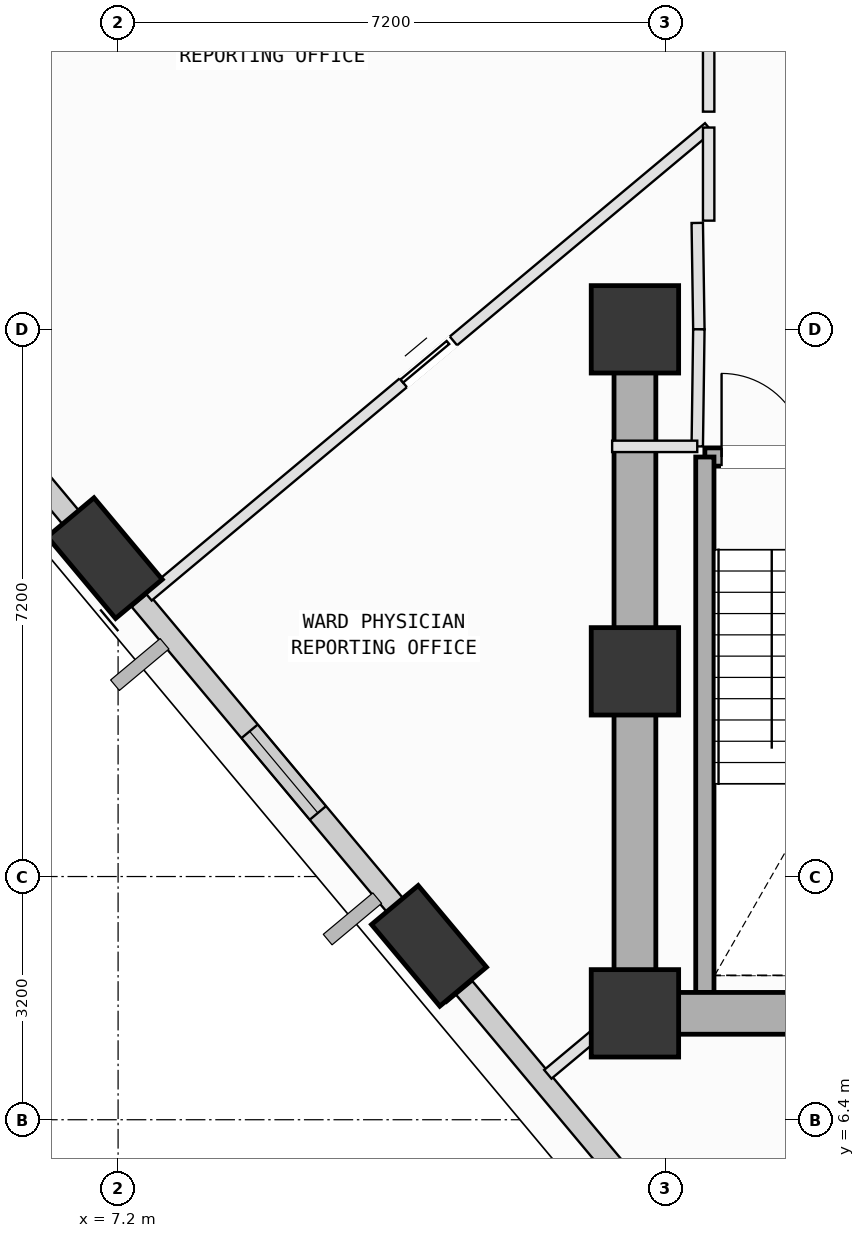
"""IFC4 building model, lengths in metres.
Left out: names, types, materials, properties, quantities, classifications, styles, units other than length and angle.
Written with IfcOpenShell. Run it as: python <this file> out.ifc"""

import sys

from ifc_helpers import new_model, si_unit, direction, frame, frame_2d, origin, origin_2d, place, context, subcontext, project, spatial, rectangle, extrude, element, fill, save


model = new_model("IFC4")
c1 = context("Model", 3, precision=1e-05, world=origin(), true_north=direction((0.0, 1.0)))
c2 = subcontext(c1, "Body", "Model", "MODEL_VIEW")
j1 = project(units=[si_unit("LENGTHUNIT", "METRE"), si_unit("PLANEANGLEUNIT", "RADIAN")], contexts=[c1])
p1 = place(None, origin())
s1 = spatial("IfcSite", under=j1, at=p1, CompositionType="ELEMENT")
p2 = place(p1, origin())
s2 = spatial("IfcBuilding", under=s1, at=p2, CompositionType="ELEMENT")
p3 = place(p2, frame((0.0, 0.0, 193.8)))
s3 = spatial("IfcBuildingStorey", under=s2, at=p3, CompositionType="ELEMENT", Elevation=193.8)
for number, where, z_axis, x_axis in (
    (1, (14.0, 7.8, 0.0), (0.0, 0.0, 1.0), (1.0, 0.0, 0.0)),
    (2, (14.0, 12.3, 0.0), (0.0, 0.0, 1.0), (1.0, 0.0, 0.0)),
    (3, (14.0, 16.8, 0.0), (0.0, 0.0, 1.0), (1.0, 0.0, 0.0)),
):
    element("IfcColumn", number, at=place(p3, frame(where, z_axis=z_axis, x_axis=x_axis)), inside=s3, PredefinedType="COLUMN", context=c2, shape_type="SweptSolid", body=[
        extrude(rectangle(XDim=1.15, YDim=1.15, at=origin_2d()), origin(), (0.0, 0.0, 1.0), 4.0),
    ])
p4 = place(p3, frame((7.025, 13.79, 0.002), z_axis=(0.046223942846, -0.109008432146, 0.992965512407), x_axis=(-0.8879381116, 0.450904474812, 0.090835370657)))
e4 = element("IfcColumn", 4, at=p4, inside=s3, PredefinedType="COLUMN", context=c2, shape_type="SweptSolid", body=[
    extrude(rectangle(XDim=1.4, YDim=0.8, at=origin_2d()), origin(), (0.0, 0.0, 1.0), 4.025),
])
p5 = place(p3, frame((11.291, 8.688, 0.002), z_axis=(0.06713117767, -0.091349387336, 0.993553568972), x_axis=(-0.968253797519, 0.234352396494, 0.08696860265)))
e5 = element("IfcColumn", 5, at=p5, inside=s3, PredefinedType="COLUMN", context=c2, shape_type="SweptSolid", body=[
    extrude(rectangle(XDim=1.4, YDim=0.8, at=origin_2d()), origin(), (0.0, 0.0, 1.0), 4.022),
])
p6 = place(p3, frame((6.856, 13.992, 0.0), z_axis=(0.0, 0.0, 1.0), x_axis=(-0.641446591331, 0.767167693839, 0.0)))
e6 = element("IfcWall", 6, at=p6, inside=s3, PredefinedType="SOLIDWALL", context=c2, shape_type="SweptSolid", body=[
    extrude(rectangle(XDim=5.628, YDim=0.28, at=frame_2d((2.814, 0.0))), origin(), (0.0, 0.0, 1.0), 3.265),
])
p7 = place(p6, frame((1.811, 0.0, 0.75)))
e7 = element("IfcOpeningElement", 7, at=p7, cuts=e6, PredefinedType="OPENING", context=c2, shape_type="SweptSolid", body=[
    extrude(rectangle(XDim=2.0, YDim=1.95, at=frame_2d((1.0, 0.975))), frame((0.0, 0.15, 0.0), z_axis=(0.0, -1.0, 0.0), x_axis=(1.0, 0.0, 0.0)), (0.0, 0.0, 1.0), 0.3),
])
p8 = place(p3, frame((11.118, 8.894, 0.0), z_axis=(0.0, 0.0, 1.0), x_axis=(-0.641464322238, 0.76715286827, 0.0)))
e8 = element("IfcWall", 8, at=p8, inside=s3, PredefinedType="SOLIDWALL", context=c2, shape_type="SweptSolid", body=[
    extrude(rectangle(XDim=5.662, YDim=0.28, at=frame_2d((2.831, 0.0))), origin(), (0.0, 0.0, 1.0), 3.265),
])
p9 = place(p8, frame((2.011, 0.0, 0.75)))
e9 = element("IfcOpeningElement", 9, at=p9, cuts=e8, PredefinedType="OPENING", context=c2, shape_type="SweptSolid", body=[
    extrude(rectangle(XDim=1.4, YDim=1.85, at=frame_2d((0.7, 0.925))), frame((0.0, 0.15, 0.0), z_axis=(0.0, -1.0, 0.0), x_axis=(1.0, 0.0, 0.0)), (0.0, 0.0, 1.0), 0.3),
])
p10 = place(p3, frame((16.476, 2.487, 0.0), z_axis=(0.0, 0.0, 1.0), x_axis=(-0.641449443944, 0.767165308694, 0.0)))
e10 = element("IfcWall", 10, at=p10, inside=s3, PredefinedType="SOLIDWALL", context=c2, shape_type="SweptSolid", body=[
    extrude(rectangle(XDim=7.36, YDim=0.28, at=frame_2d((3.68, 0.0))), origin(), (0.0, 0.0, 1.0), 3.265),
])
p11 = place(p10, frame((1.888, 0.0, 0.75)))
e11 = element("IfcOpeningElement", 11, at=p11, cuts=e10, PredefinedType="OPENING", context=c2, shape_type="SweptSolid", body=[
    extrude(rectangle(XDim=1.8, YDim=2.05, at=frame_2d((0.9, 1.025))), frame((0.0, 0.15, 0.0), z_axis=(0.0, -1.0, 0.0), x_axis=(1.0, 0.0, 0.0)), (0.0, 0.0, 1.0), 0.3),
])
p12 = place(p3, frame((14.92, 15.12, 0.0), z_axis=(0.0, 0.0, 1.0), x_axis=(1.0, 0.0, 0.0)))
e12 = element("IfcWall", 12, at=p12, inside=s3, PredefinedType="SOLIDWALL", context=c2, shape_type="SweptSolid", body=[
    extrude(rectangle(XDim=3.46, YDim=0.24, at=frame_2d((1.73, 0.0))), origin(), (0.0, 0.0, 1.0), 3.78),
])
p13 = place(p12, frame((0.22, 0.0, 0.0)))
e13 = element("IfcOpeningElement", 13, at=p13, cuts=e12, PredefinedType="OPENING", context=c2, shape_type="SweptSolid", body=[
    extrude(rectangle(XDim=1.1, YDim=2.15, at=frame_2d((0.55, 1.075))), frame((0.0, 0.13, 0.0), z_axis=(0.0, -1.0, 0.0), x_axis=(1.0, 0.0, 0.0)), (0.0, 0.0, 1.0), 0.26),
])
p14 = place(p3, frame((14.92, 8.075, 0.0), z_axis=(0.0, 0.0, 1.0), x_axis=(0.0, 1.0, 0.0)))
e14 = element("IfcWall", 14, at=p14, inside=s3, PredefinedType="SOLIDWALL", context=c2, shape_type="SweptSolid", body=[
    extrude(rectangle(XDim=7.045, YDim=0.24, at=frame_2d((3.522, 0.0))), origin(), (0.0, 0.0, 1.0), 3.78),
])
p15 = place(p3, frame((14.0, 7.8, 0.0), z_axis=(0.0, 0.0, 1.0), x_axis=(1.0, 0.0, 0.0)))
e15 = element("IfcWall", 15, at=p15, inside=s3, PredefinedType="SHEAR", context=c2, shape_type="SweptSolid", body=[
    extrude(rectangle(XDim=10.8, YDim=0.55, at=frame_2d((5.4, 0.0))), origin(), (0.0, 0.0, 1.0), 3.78),
])
p16 = place(p3, frame((14.0, 16.8, 0.0), z_axis=(0.0, 0.0, 1.0), x_axis=(0.0, -1.0, 0.0)))
e16 = element("IfcWall", 16, at=p16, inside=s3, PredefinedType="SHEAR", context=c2, shape_type="SweptSolid", body=[
    extrude(rectangle(XDim=9.0, YDim=0.55, at=frame_2d((4.5, 0.0))), origin(), (0.0, 0.0, 1.0), 3.78),
])
p17 = place(p3, frame((12.854, 6.998, 0.0), z_axis=(0.0, 0.0, 1.0), x_axis=(0.767294778418, 0.641294568052, 0.0)))
e17 = element("IfcWall", 17, at=p17, inside=s3, PredefinedType="PARTITIONING", context=c2, shape_type="SweptSolid", body=[
    extrude(rectangle(XDim=1.103, YDim=0.15, at=frame_2d((0.551, 0.0))), origin(), (0.0, 0.0, 1.0), 3.78),
])
p18 = place(p3, frame((14.82, 18.2, 0.0), z_axis=(0.0, 0.0, 1.0), x_axis=(0.01499656939, -0.99988754513, 0.0)))
e18 = element("IfcWall", 18, at=p18, inside=s3, PredefinedType="PARTITIONING", context=c2, shape_type="SweptSolid", body=[
    extrude(rectangle(XDim=1.4, YDim=0.15, at=frame_2d((0.7, 0.0))), origin(), (0.0, 0.0, 1.0), 3.78),
])
p19 = place(p3, frame((14.841, 16.8, 0.0), z_axis=(0.0, 0.0, 1.0), x_axis=(-0.01363221443, -0.999907077048, 0.0)))
e19 = element("IfcWall", 19, at=p19, inside=s3, PredefinedType="PARTITIONING", context=c2, shape_type="SweptSolid", body=[
    extrude(rectangle(XDim=1.54, YDim=0.15, at=frame_2d((0.77, 0.0))), origin(), (0.0, 0.0, 1.0), 3.78),
])
p20 = place(p3, frame((14.82, 15.26, 0.0), z_axis=(0.0, 0.0, 1.0), x_axis=(-1.0, 0.0, 0.0)))
e20 = element("IfcWall", 20, at=p20, inside=s3, PredefinedType="PARTITIONING", context=c2, shape_type="SweptSolid", body=[
    extrude(rectangle(XDim=1.12, YDim=0.15, at=frame_2d((0.56, 0.0))), origin(), (0.0, 0.0, 1.0), 3.78),
])
p21 = place(p3, frame((11.578, 7.986, 0.0), z_axis=(0.0, 0.0, 1.0), x_axis=(-0.641273361518, 0.767312502054, 0.0)))
e21 = element("IfcWall", 21, at=p21, inside=s3, PredefinedType="PARTITIONING", context=c2, shape_type="SweptSolid", body=[
    extrude(rectangle(XDim=0.992, YDim=0.15, at=frame_2d((0.496, 0.0))), origin(), (0.0, 0.0, 1.0), 3.265),
])
p22 = place(p3, frame((7.594, 13.289, 0.0), z_axis=(0.0, 0.0, 1.0), x_axis=(0.767229543611, 0.64137261199, 0.0)))
e22 = element("IfcWall", 22, at=p22, inside=s3, PredefinedType="PARTITIONING", context=c2, shape_type="SweptSolid", body=[
    extrude(rectangle(XDim=9.614, YDim=0.15, at=frame_2d((4.807, 0.0))), origin(), (0.0, 0.0, 1.0), 3.78),
])
p23 = place(p22, frame((4.377, 0.0, 0.0)))
e23 = element("IfcOpeningElement", 23, at=p23, cuts=e22, PredefinedType="OPENING", context=c2, shape_type="SweptSolid", body=[
    extrude(rectangle(XDim=0.86, YDim=2.06, at=frame_2d((0.43, 1.03))), frame((0.0, 0.085, 0.0), z_axis=(0.0, -1.0, 0.0), x_axis=(1.0, 0.0, 0.0)), (0.0, 0.0, 1.0), 0.17),
])
p24 = place(p3, frame((14.97, 19.455, 0.0), z_axis=(0.0, 0.0, 1.0), x_axis=(0.0, -1.0, 0.0)))
e24 = element("IfcWall", 24, at=p24, inside=s3, PredefinedType="PARTITIONING", context=c2, shape_type="SweptSolid", body=[
    extrude(rectangle(XDim=1.225, YDim=0.15, at=frame_2d((0.613, 0.0))), origin(), (0.0, 0.0, 1.0), 3.78),
])
p25 = place(p3, frame((14.97, 20.55, 0.0), z_axis=(0.0, 0.0, 1.0), x_axis=(0.0, -1.0, 0.0)))
e25 = element("IfcWall", 25, at=p25, inside=s3, PredefinedType="PARTITIONING", context=c2, shape_type="SweptSolid", body=[
    extrude(rectangle(XDim=0.886, YDim=0.15, at=frame_2d((0.443, 0.0))), origin(), (0.0, 0.0, 1.0), 3.78),
])
p26 = place(p3, frame((7.227, 13.19, 0.0), z_axis=(0.0, 0.0, 1.0), x_axis=(-0.641619521799, 0.767023069566, 0.0)))
e26 = element("IfcWall", 26, at=p26, inside=s3, PredefinedType="PARTITIONING", context=c2, shape_type="SweptSolid", body=[
    extrude(rectangle(XDim=0.853, YDim=0.15, at=frame_2d((0.426, 0.0))), origin(), (0.0, 0.0, 1.0), 3.265),
])
p27 = place(p3, frame((2.814, 19.98, 0.0), z_axis=(0.0, 0.0, 1.0), x_axis=(0.767178435157, 0.641433744537, 0.0)))
e27 = element("IfcWall", 27, at=p27, inside=s3, PredefinedType="PARTITIONING", context=c2, shape_type="SweptSolid", body=[
    extrude(rectangle(XDim=14.56, YDim=0.15, at=frame_2d((7.28, 0.0))), origin(), (0.0, 0.0, 1.0), 3.78),
])
p28 = place(p27, frame((7.244, 0.0, 0.0)))
e28 = element("IfcOpeningElement", 28, at=p28, cuts=e27, PredefinedType="OPENING", context=c2, shape_type="SweptSolid", body=[
    extrude(rectangle(XDim=0.86, YDim=2.06, at=frame_2d((0.43, 1.03))), frame((0.0, 0.085, 0.0), z_axis=(0.0, -1.0, 0.0), x_axis=(1.0, 0.0, 0.0)), (0.0, 0.0, 1.0), 0.17),
])
p29 = place(p9, origin())
e29 = element("IfcWindow", 29, at=p29, inside=s3, PartitioningType="SINGLE_PANEL", PredefinedType="WINDOW", context=c2, shape_type="SweptSolid", body=[
    extrude(rectangle(XDim=1.4, YDim=1.85, at=frame_2d((0.7, 0.925))), frame((0.0, 0.03, 0.0), z_axis=(0.0, -1.0, 0.0), x_axis=(1.0, 0.0, 0.0)), (0.0, 0.0, 1.0), 0.06),
])
fill(e9, e29)
p30 = place(p13, origin())
e30 = element("IfcDoor", 30, at=p30, inside=s3, OperationType="SINGLE_SWING_LEFT", PredefinedType="DOOR", context=c2, shape_type="SweptSolid", body=[
    extrude(rectangle(XDim=1.1, YDim=2.15, at=frame_2d((0.55, 1.075))), frame((0.0, 0.025, 0.0), z_axis=(0.0, -1.0, 0.0), x_axis=(1.0, 0.0, 0.0)), (0.0, 0.0, 1.0), 0.05),
])
fill(e13, e30)
p31 = place(p23, origin())
e31 = element("IfcDoor", 31, at=p31, inside=s3, OperationType="SLIDING_TO_LEFT", PredefinedType="DOOR", context=c2, shape_type="SweptSolid", body=[
    extrude(rectangle(XDim=0.86, YDim=2.06, at=frame_2d((0.43, 1.03))), frame((0.0, 0.025, 0.0), z_axis=(0.0, -1.0, 0.0), x_axis=(1.0, 0.0, 0.0)), (0.0, 0.0, 1.0), 0.05),
])
fill(e23, e31)
save(model, sys.argv[1])
